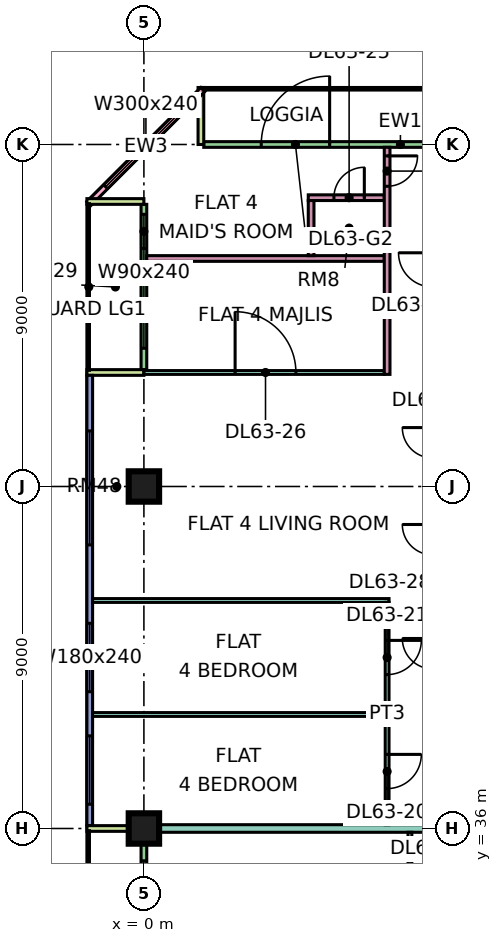
"""IFC4 building model, lengths in metres.
Left out: names, types, materials, properties, quantities, classifications, styles, units other than length and angle.
Written with IfcOpenShell. Run it as: python <this file> out.ifc"""

import sys

from ifc_helpers import new_model, si_unit, direction, frame, frame_2d, origin, origin_2d, place, context, subcontext, project, spatial, rectangle, extrude, element, fill, save


model = new_model("IFC4")
c1 = context("Model", 3, precision=1e-05, world=origin(), true_north=direction((0.0, 1.0)))
c2 = subcontext(c1, "Body", "Model", "MODEL_VIEW")
j1 = project(units=[si_unit("LENGTHUNIT", "METRE"), si_unit("PLANEANGLEUNIT", "RADIAN")], contexts=[c1])
p1 = place(None, origin())
s1 = spatial("IfcSite", under=j1, at=p1, CompositionType="ELEMENT")
p2 = place(p1, origin())
s2 = spatial("IfcBuilding", under=s1, at=p2, CompositionType="ELEMENT")
p3 = place(p2, frame((0.0, 0.0, 273.4)))
s3 = spatial("IfcBuildingStorey", under=s2, at=p3, CompositionType="ELEMENT", Elevation=273.4)
p4 = place(p3, frame((0.0, 36.0, 0.0), z_axis=(0.0, 0.0, 1.0), x_axis=(1.0, 0.0, 0.0)))
e1 = element("IfcColumn", 1, at=p4, inside=s3, PredefinedType="COLUMN", context=c2, shape_type="SweptSolid", body=[
    extrude(rectangle(XDim=0.8, YDim=0.8, at=origin_2d()), origin(), (0.0, 0.0, 1.0), 3.75),
])
p5 = place(p3, frame((0.0, 45.0, 0.0), z_axis=(0.0, 0.0, 1.0), x_axis=(1.0, 0.0, 0.0)))
e2 = element("IfcColumn", 2, at=p5, inside=s3, PredefinedType="COLUMN", context=c2, shape_type="SweptSolid", body=[
    extrude(rectangle(XDim=0.8, YDim=0.8, at=origin_2d()), origin(), (0.0, 0.0, 1.0), 3.75),
])
p6 = place(p3, frame((11.925, 54.0, 0.0), z_axis=(0.0, 0.0, 1.0), x_axis=(-1.0, 0.0, 0.0)))
e3 = element("IfcWall", 3, at=p6, inside=s3, PredefinedType="SOLIDWALL", context=c2, shape_type="SweptSolid", body=[
    extrude(rectangle(XDim=10.35, YDim=0.15, at=frame_2d((5.175, 0.0))), origin(), (0.0, 0.0, 1.0), 3.35),
])
p7 = place(p6, frame((0.875, 0.0, 0.45)))
e4 = element("IfcOpeningElement", 4, at=p7, cuts=e3, PredefinedType="OPENING", context=c2, shape_type="SweptSolid", body=[
    extrude(rectangle(XDim=3.0, YDim=2.4, at=frame_2d((1.5, 1.2))), frame((0.0, 0.085, 0.0), z_axis=(0.0, -1.0, 0.0), x_axis=(1.0, 0.0, 0.0)), (0.0, 0.0, 1.0), 0.17),
])
p8 = place(p6, frame((7.038, 0.0, 0.0)))
e5 = element("IfcOpeningElement", 5, at=p8, cuts=e3, PredefinedType="OPENING", context=c2, shape_type="SweptSolid", body=[
    extrude(rectangle(XDim=1.8, YDim=2.4, at=frame_2d((0.9, 1.2))), frame((0.0, 0.085, 0.0), z_axis=(0.0, -1.0, 0.0), x_axis=(1.0, 0.0, 0.0)), (0.0, 0.0, 1.0), 0.17),
])
p9 = place(p3, frame((1.5, 55.5, 0.0), z_axis=(0.0, 0.0, 1.0), x_axis=(0.0, -1.0, 0.0)))
e6 = element("IfcWall", 6, at=p9, inside=s3, PredefinedType="SOLIDWALL", context=c2, shape_type="SweptSolid", body=[
    extrude(rectangle(XDim=1.5, YDim=0.15, at=frame_2d((0.75, 0.0))), origin(), (0.0, 0.0, 1.0), 3.35),
])
p10 = place(p3, frame((1.553, 55.447, 0.0), z_axis=(0.0, 0.0, 1.0), x_axis=(-0.707106781187, -0.707106781187, 0.0)))
e7 = element("IfcWall", 7, at=p10, inside=s3, PredefinedType="SOLIDWALL", context=c2, shape_type="SweptSolid", body=[
    extrude(rectangle(XDim=4.243, YDim=0.15, at=frame_2d((2.121, 0.0))), origin(), (0.0, 0.0, 1.0), 3.35),
])
p11 = place(p10, frame((0.621, 0.0, 0.45)))
e8 = element("IfcOpeningElement", 8, at=p11, cuts=e7, PredefinedType="OPENING", context=c2, shape_type="SweptSolid", body=[
    extrude(rectangle(XDim=3.0, YDim=2.4, at=frame_2d((1.5, 1.2))), frame((0.0, 0.085, 0.0), z_axis=(0.0, -1.0, 0.0), x_axis=(1.0, 0.0, 0.0)), (0.0, 0.0, 1.0), 0.17),
])
p12 = place(p3, frame((0.0, 52.425, 0.0), z_axis=(0.0, 0.0, 1.0), x_axis=(0.0, -1.0, 0.0)))
e9 = element("IfcWall", 9, at=p12, inside=s3, PredefinedType="SOLIDWALL", context=c2, shape_type="SweptSolid", body=[
    extrude(rectangle(XDim=4.35, YDim=0.15, at=frame_2d((2.175, 0.0))), origin(), (0.0, 0.0, 1.0), 3.35),
])
p13 = place(p12, frame((0.262, 0.0, 0.45)))
e10 = element("IfcOpeningElement", 10, at=p13, cuts=e9, PredefinedType="OPENING", context=c2, shape_type="SweptSolid", body=[
    extrude(rectangle(XDim=0.9, YDim=2.4, at=frame_2d((0.45, 1.2))), frame((0.0, 0.085, 0.0), z_axis=(0.0, -1.0, 0.0), x_axis=(1.0, 0.0, 0.0)), (0.0, 0.0, 1.0), 0.17),
])
p14 = place(p12, frame((1.988, 0.0, 0.45)))
e11 = element("IfcOpeningElement", 11, at=p14, cuts=e9, PredefinedType="OPENING", context=c2, shape_type="SweptSolid", body=[
    extrude(rectangle(XDim=1.8, YDim=2.4, at=frame_2d((0.9, 1.2))), frame((0.0, 0.085, 0.0), z_axis=(0.0, -1.0, 0.0), x_axis=(1.0, 0.0, 0.0)), (0.0, 0.0, 1.0), 0.17),
])
for number, where, z_axis, x_axis in (
    (12, (-1.5, 52.5, 0.0), (0.0, 0.0, 1.0), (1.0, 0.0, 0.0)),
    (13, (-1.5, 48.0, 0.0), (0.0, 0.0, 1.0), (1.0, 0.0, 0.0)),
):
    element("IfcWall", number, at=place(p3, frame(where, z_axis=z_axis, x_axis=x_axis)), inside=s3, PredefinedType="SOLIDWALL", context=c2, shape_type="SweptSolid", body=[
        extrude(rectangle(XDim=1.5, YDim=0.15, at=frame_2d((0.75, 0.0))), origin(), (0.0, 0.0, 1.0), 3.35),
    ])
p15 = place(p3, frame((-1.425, 47.925, 0.0), z_axis=(0.0, 0.0, 1.0), x_axis=(0.0, -1.0, 0.0)))
e14 = element("IfcWall", 14, at=p15, inside=s3, PredefinedType="SOLIDWALL", context=c2, shape_type="SweptSolid", body=[
    extrude(rectangle(XDim=11.85, YDim=0.15, at=frame_2d((5.925, 0.0))), origin(), (0.0, 0.0, 1.0), 3.35),
])
p16 = place(p15, frame((1.462, 0.0, 0.45)))
e15 = element("IfcOpeningElement", 15, at=p16, cuts=e14, PredefinedType="OPENING", context=c2, shape_type="SweptSolid", body=[
    extrude(rectangle(XDim=3.0, YDim=2.4, at=frame_2d((1.5, 1.2))), frame((0.0, 0.085, 0.0), z_axis=(0.0, -1.0, 0.0), x_axis=(1.0, 0.0, 0.0)), (0.0, 0.0, 1.0), 0.17),
])
p17 = place(p15, frame((6.525, 0.0, 0.45)))
e16 = element("IfcOpeningElement", 16, at=p17, cuts=e14, PredefinedType="OPENING", context=c2, shape_type="SweptSolid", body=[
    extrude(rectangle(XDim=1.8, YDim=2.4, at=frame_2d((0.9, 1.2))), frame((0.0, 0.085, 0.0), z_axis=(0.0, -1.0, 0.0), x_axis=(1.0, 0.0, 0.0)), (0.0, 0.0, 1.0), 0.17),
])
p18 = place(p15, frame((9.488, 0.0, 0.45)))
e17 = element("IfcOpeningElement", 17, at=p18, cuts=e14, PredefinedType="OPENING", context=c2, shape_type="SweptSolid", body=[
    extrude(rectangle(XDim=1.8, YDim=2.4, at=frame_2d((0.9, 1.2))), frame((0.0, 0.085, 0.0), z_axis=(0.0, -1.0, 0.0), x_axis=(1.0, 0.0, 0.0)), (0.0, 0.0, 1.0), 0.17),
])
p19 = place(p3, frame((0.0, 35.925, 0.0), z_axis=(0.0, 0.0, 1.0), x_axis=(0.0, -1.0, 0.0)))
e18 = element("IfcWall", 18, at=p19, inside=s3, PredefinedType="SOLIDWALL", context=c2, shape_type="SweptSolid", body=[
    extrude(rectangle(XDim=11.85, YDim=0.15, at=frame_2d((5.925, 0.0))), origin(), (0.0, 0.0, 1.0), 3.35),
])
p20 = place(p19, frame((0.775, 0.0, 0.45)))
e19 = element("IfcOpeningElement", 19, at=p20, cuts=e18, PredefinedType="OPENING", context=c2, shape_type="SweptSolid", body=[
    extrude(rectangle(XDim=1.8, YDim=2.4, at=frame_2d((0.9, 1.2))), frame((0.0, 0.085, 0.0), z_axis=(0.0, -1.0, 0.0), x_axis=(1.0, 0.0, 0.0)), (0.0, 0.0, 1.0), 0.17),
])
p21 = place(p19, frame((3.525, 0.0, 0.0)))
e20 = element("IfcOpeningElement", 20, at=p21, cuts=e18, PredefinedType="OPENING", context=c2, shape_type="SweptSolid", body=[
    extrude(rectangle(XDim=1.8, YDim=2.4, at=frame_2d((0.9, 1.2))), frame((0.0, 0.085, 0.0), z_axis=(0.0, -1.0, 0.0), x_axis=(1.0, 0.0, 0.0)), (0.0, 0.0, 1.0), 0.17),
])
p22 = place(p19, frame((7.175, 0.0, 0.45)))
e21 = element("IfcOpeningElement", 21, at=p22, cuts=e18, PredefinedType="OPENING", context=c2, shape_type="SweptSolid", body=[
    extrude(rectangle(XDim=3.0, YDim=2.4, at=frame_2d((1.5, 1.2))), frame((0.0, 0.085, 0.0), z_axis=(0.0, -1.0, 0.0), x_axis=(1.0, 0.0, 0.0)), (0.0, 0.0, 1.0), 0.17),
])
p23 = place(p3, frame((-1.5, 36.0, 0.0), z_axis=(0.0, 0.0, 1.0), x_axis=(1.0, 0.0, 0.0)))
e22 = element("IfcWall", 22, at=p23, inside=s3, PredefinedType="SOLIDWALL", context=c2, shape_type="SweptSolid", body=[
    extrude(rectangle(XDim=1.5, YDim=0.15, at=frame_2d((0.75, 0.0))), origin(), (0.0, 0.0, 1.0), 3.35),
])
p24 = place(p3, frame((-1.351, 39.0, 0.0), z_axis=(0.0, 0.0, 1.0), x_axis=(1.0, 0.0, 0.0)))
e23 = element("IfcWall", 23, at=p24, inside=s3, PredefinedType="PARTITIONING", context=c2, shape_type="SweptSolid", body=[
    extrude(rectangle(XDim=7.701, YDim=0.1, at=frame_2d((3.851, 0.0))), origin(), (0.0, 0.0, 1.0), 3.35),
])
e24 = element("IfcWall", 24, at=p4, inside=s3, PredefinedType="PARTITIONING", context=c2, shape_type="SweptSolid", body=[
    extrude(rectangle(XDim=12.3, YDim=0.2, at=frame_2d((6.15, 0.0))), origin(), (0.0, 0.0, 1.0), 3.35),
])
p25 = place(p3, frame((-1.35, 42.0, 0.0), z_axis=(0.0, 0.0, 1.0), x_axis=(1.0, 0.0, 0.0)))
e25 = element("IfcWall", 25, at=p25, inside=s3, PredefinedType="PARTITIONING", context=c2, shape_type="SweptSolid", body=[
    extrude(rectangle(XDim=7.8, YDim=0.1, at=frame_2d((3.9, 0.0))), origin(), (0.0, 0.0, 1.0), 3.35),
])
p26 = place(p3, frame((0.0, 48.0, 0.0), z_axis=(0.0, 0.0, 1.0), x_axis=(1.0, 0.0, 0.0)))
e26 = element("IfcWall", 26, at=p26, inside=s3, PredefinedType="PARTITIONING", context=c2, shape_type="SweptSolid", body=[
    extrude(rectangle(XDim=6.325, YDim=0.1, at=frame_2d((3.163, 0.0))), origin(), (0.0, 0.0, 1.0), 3.35),
])
p27 = place(p26, frame((2.4, 0.0, 0.0)))
e27 = element("IfcOpeningElement", 27, at=p27, cuts=e26, PredefinedType="OPENING", context=c2, shape_type="SweptSolid", body=[
    extrude(rectangle(XDim=1.6, YDim=2.1, at=frame_2d((0.8, 1.05))), frame((0.0, 0.06, 0.0), z_axis=(0.0, -1.0, 0.0), x_axis=(1.0, 0.0, 0.0)), (0.0, 0.0, 1.0), 0.12),
])
p28 = place(p3, frame((0.074, 51.0, 0.0), z_axis=(0.0, 0.0, 1.0), x_axis=(1.0, 0.0, 0.0)))
e28 = element("IfcWall", 28, at=p28, inside=s3, PredefinedType="PARTITIONING", context=c2, shape_type="SweptSolid", body=[
    extrude(rectangle(XDim=6.251, YDim=0.15, at=frame_2d((3.125, 0.0))), origin(), (0.0, 0.0, 1.0), 3.35),
])
p29 = place(p3, frame((4.325, 52.6, 0.0), z_axis=(0.0, 0.0, 1.0), x_axis=(1.0, 0.0, 0.0)))
e29 = element("IfcWall", 29, at=p29, inside=s3, PredefinedType="PARTITIONING", context=c2, shape_type="SweptSolid", body=[
    extrude(rectangle(XDim=2.0, YDim=0.15, at=frame_2d((1.0, 0.0))), origin(), (0.0, 0.0, 1.0), 3.35),
])
p30 = place(p29, frame((0.675, 0.0, 0.0)))
e30 = element("IfcOpeningElement", 30, at=p30, cuts=e29, PredefinedType="OPENING", context=c2, shape_type="SweptSolid", body=[
    extrude(rectangle(XDim=0.8, YDim=2.1, at=frame_2d((0.4, 1.05))), frame((0.0, 0.085, 0.0), z_axis=(0.0, -1.0, 0.0), x_axis=(1.0, 0.0, 0.0)), (0.0, 0.0, 1.0), 0.17),
])
p31 = place(p3, frame((4.4, 51.075, 0.0), z_axis=(0.0, 0.0, 1.0), x_axis=(0.0, 1.0, 0.0)))
e31 = element("IfcWall", 31, at=p31, inside=s3, PredefinedType="PARTITIONING", context=c2, shape_type="SweptSolid", body=[
    extrude(rectangle(XDim=1.45, YDim=0.15, at=frame_2d((0.725, 0.0))), origin(), (0.0, 0.0, 1.0), 3.35),
])
p32 = place(p3, frame((6.4, 36.1, 0.0), z_axis=(0.0, 0.0, 1.0), x_axis=(0.0, 1.0, 0.0)))
e32 = element("IfcWall", 32, at=p32, inside=s3, PredefinedType="PARTITIONING", context=c2, shape_type="SweptSolid", body=[
    extrude(rectangle(XDim=5.85, YDim=0.1, at=frame_2d((2.925, 0.0))), origin(), (0.0, 0.0, 1.0), 3.35),
])
p33 = place(p32, frame((0.95, 0.0, 0.0)))
e33 = element("IfcOpeningElement", 33, at=p33, cuts=e32, PredefinedType="OPENING", context=c2, shape_type="SweptSolid", body=[
    extrude(rectangle(XDim=0.9, YDim=2.1, at=frame_2d((0.45, 1.05))), frame((0.0, 0.06, 0.0), z_axis=(0.0, -1.0, 0.0), x_axis=(1.0, 0.0, 0.0)), (0.0, 0.0, 1.0), 0.12),
])
p34 = place(p32, frame((3.95, 0.0, 0.0)))
e34 = element("IfcOpeningElement", 34, at=p34, cuts=e32, PredefinedType="OPENING", context=c2, shape_type="SweptSolid", body=[
    extrude(rectangle(XDim=0.9, YDim=2.1, at=frame_2d((0.45, 1.05))), frame((0.0, 0.06, 0.0), z_axis=(0.0, -1.0, 0.0), x_axis=(1.0, 0.0, 0.0)), (0.0, 0.0, 1.0), 0.12),
])
p35 = place(p3, frame((6.4, 47.95, 0.0), z_axis=(0.0, 0.0, 1.0), x_axis=(0.0, 1.0, 0.0)))
e35 = element("IfcWall", 35, at=p35, inside=s3, PredefinedType="PARTITIONING", context=c2, shape_type="SweptSolid", body=[
    extrude(rectangle(XDim=5.976, YDim=0.15, at=frame_2d((2.988, 0.0))), origin(), (0.0, 0.0, 1.0), 3.35),
])
p36 = place(p35, frame((4.95, 0.0, 0.0)))
e36 = element("IfcOpeningElement", 36, at=p36, cuts=e35, PredefinedType="OPENING", context=c2, shape_type="SweptSolid", body=[
    extrude(rectangle(XDim=0.8, YDim=2.1, at=frame_2d((0.4, 1.05))), frame((0.0, 0.085, 0.0), z_axis=(0.0, -1.0, 0.0), x_axis=(1.0, 0.0, 0.0)), (0.0, 0.0, 1.0), 0.17),
])
p37 = place(p3, frame((7.0, 30.05, 0.0), z_axis=(0.0, 0.0, 1.0), x_axis=(0.0, 1.0, 0.0)))
e37 = element("IfcWall", 37, at=p37, inside=s3, PredefinedType="PARTITIONING", context=c2, shape_type="SweptSolid", body=[
    extrude(rectangle(XDim=5.85, YDim=0.1, at=frame_2d((2.925, 0.0))), origin(), (0.0, 0.0, 1.0), 3.35),
])
p38 = place(p37, frame((1.0, 0.0, 0.0)))
e38 = element("IfcOpeningElement", 38, at=p38, cuts=e37, PredefinedType="OPENING", context=c2, shape_type="SweptSolid", body=[
    extrude(rectangle(XDim=0.9, YDim=2.1, at=frame_2d((0.45, 1.05))), frame((0.0, 0.06, 0.0), z_axis=(0.0, -1.0, 0.0), x_axis=(1.0, 0.0, 0.0)), (0.0, 0.0, 1.0), 0.12),
])
p39 = place(p37, frame((4.0, 0.0, 0.0)))
e39 = element("IfcOpeningElement", 39, at=p39, cuts=e37, PredefinedType="OPENING", context=c2, shape_type="SweptSolid", body=[
    extrude(rectangle(XDim=0.9, YDim=2.1, at=frame_2d((0.45, 1.05))), frame((0.0, 0.06, 0.0), z_axis=(0.0, -1.0, 0.0), x_axis=(1.0, 0.0, 0.0)), (0.0, 0.0, 1.0), 0.12),
])
p40 = place(p8, frame((1.8, 0.0, 0.0), z_axis=(0.0, 0.0, 1.0), x_axis=(-1.0, 0.0, 0.0)))
e40 = element("IfcDoor", 40, at=p40, inside=s3, OperationType="DOUBLE_DOOR_SINGLE_SWING", PredefinedType="DOOR", context=c2, shape_type="SweptSolid", body=[
    extrude(rectangle(XDim=1.8, YDim=2.4, at=frame_2d((0.9, 1.2))), frame((0.0, 0.025, 0.0), z_axis=(0.0, -1.0, 0.0), x_axis=(1.0, 0.0, 0.0)), (0.0, 0.0, 1.0), 0.05),
])
fill(e5, e40)
p41 = place(p11, origin())
e41 = element("IfcWindow", 41, at=p41, inside=s3, PartitioningType="SINGLE_PANEL", PredefinedType="WINDOW", context=c2, shape_type="SweptSolid", body=[
    extrude(rectangle(XDim=3.0, YDim=2.4, at=frame_2d((1.5, 1.2))), frame((0.0, 0.03, 0.0), z_axis=(0.0, -1.0, 0.0), x_axis=(1.0, 0.0, 0.0)), (0.0, 0.0, 1.0), 0.06),
])
fill(e8, e41)
p42 = place(p13, origin())
e42 = element("IfcWindow", 42, at=p42, inside=s3, PartitioningType="SINGLE_PANEL", PredefinedType="WINDOW", context=c2, shape_type="SweptSolid", body=[
    extrude(rectangle(XDim=0.9, YDim=2.4, at=frame_2d((0.45, 1.2))), frame((0.0, 0.03, 0.0), z_axis=(0.0, -1.0, 0.0), x_axis=(1.0, 0.0, 0.0)), (0.0, 0.0, 1.0), 0.06),
])
fill(e10, e42)
p43 = place(p14, origin())
e43 = element("IfcWindow", 43, at=p43, inside=s3, PartitioningType="SINGLE_PANEL", PredefinedType="WINDOW", context=c2, shape_type="SweptSolid", body=[
    extrude(rectangle(XDim=1.8, YDim=2.4, at=frame_2d((0.9, 1.2))), frame((0.0, 0.03, 0.0), z_axis=(0.0, -1.0, 0.0), x_axis=(1.0, 0.0, 0.0)), (0.0, 0.0, 1.0), 0.06),
])
fill(e11, e43)
p44 = place(p16, origin())
e44 = element("IfcWindow", 44, at=p44, inside=s3, PartitioningType="SINGLE_PANEL", PredefinedType="WINDOW", context=c2, shape_type="SweptSolid", body=[
    extrude(rectangle(XDim=3.0, YDim=2.4, at=frame_2d((1.5, 1.2))), frame((0.0, 0.03, 0.0), z_axis=(0.0, -1.0, 0.0), x_axis=(1.0, 0.0, 0.0)), (0.0, 0.0, 1.0), 0.06),
])
fill(e15, e44)
p45 = place(p17, origin())
e45 = element("IfcWindow", 45, at=p45, inside=s3, PartitioningType="SINGLE_PANEL", PredefinedType="WINDOW", context=c2, shape_type="SweptSolid", body=[
    extrude(rectangle(XDim=1.8, YDim=2.4, at=frame_2d((0.9, 1.2))), frame((0.0, 0.03, 0.0), z_axis=(0.0, -1.0, 0.0), x_axis=(1.0, 0.0, 0.0)), (0.0, 0.0, 1.0), 0.06),
])
fill(e16, e45)
p46 = place(p18, origin())
e46 = element("IfcWindow", 46, at=p46, inside=s3, PartitioningType="SINGLE_PANEL", PredefinedType="WINDOW", context=c2, shape_type="SweptSolid", body=[
    extrude(rectangle(XDim=1.8, YDim=2.4, at=frame_2d((0.9, 1.2))), frame((0.0, 0.03, 0.0), z_axis=(0.0, -1.0, 0.0), x_axis=(1.0, 0.0, 0.0)), (0.0, 0.0, 1.0), 0.06),
])
fill(e17, e46)
p47 = place(p20, origin())
e47 = element("IfcWindow", 47, at=p47, inside=s3, PartitioningType="SINGLE_PANEL", PredefinedType="WINDOW", context=c2, shape_type="SweptSolid", body=[
    extrude(rectangle(XDim=1.8, YDim=2.4, at=frame_2d((0.9, 1.2))), frame((0.0, 0.03, 0.0), z_axis=(0.0, -1.0, 0.0), x_axis=(1.0, 0.0, 0.0)), (0.0, 0.0, 1.0), 0.06),
])
fill(e19, e47)
p48 = place(p33, origin())
e48 = element("IfcDoor", 48, at=p48, inside=s3, OperationType="SINGLE_SWING_RIGHT", PredefinedType="DOOR", context=c2, shape_type="SweptSolid", body=[
    extrude(rectangle(XDim=0.9, YDim=2.1, at=frame_2d((0.45, 1.05))), frame((0.0, 0.025, 0.0), z_axis=(0.0, -1.0, 0.0), x_axis=(1.0, 0.0, 0.0)), (0.0, 0.0, 1.0), 0.05),
])
fill(e33, e48)
p49 = place(p34, origin())
e49 = element("IfcDoor", 49, at=p49, inside=s3, OperationType="SINGLE_SWING_RIGHT", PredefinedType="DOOR", context=c2, shape_type="SweptSolid", body=[
    extrude(rectangle(XDim=0.9, YDim=2.1, at=frame_2d((0.45, 1.05))), frame((0.0, 0.025, 0.0), z_axis=(0.0, -1.0, 0.0), x_axis=(1.0, 0.0, 0.0)), (0.0, 0.0, 1.0), 0.05),
])
fill(e34, e49)
p50 = place(p36, origin())
e50 = element("IfcDoor", 50, at=p50, inside=s3, OperationType="SINGLE_SWING_RIGHT", PredefinedType="DOOR", context=c2, shape_type="SweptSolid", body=[
    extrude(rectangle(XDim=0.8, YDim=2.1, at=frame_2d((0.4, 1.05))), frame((0.0, 0.025, 0.0), z_axis=(0.0, -1.0, 0.0), x_axis=(1.0, 0.0, 0.0)), (0.0, 0.0, 1.0), 0.05),
])
fill(e36, e50)
p51 = place(p30, frame((0.8, 0.0, 0.0), z_axis=(0.0, 0.0, 1.0), x_axis=(-1.0, 0.0, 0.0)))
e51 = element("IfcDoor", 51, at=p51, inside=s3, OperationType="SINGLE_SWING_RIGHT", PredefinedType="DOOR", context=c2, shape_type="SweptSolid", body=[
    extrude(rectangle(XDim=0.8, YDim=2.1, at=frame_2d((0.4, 1.05))), frame((0.0, 0.025, 0.0), z_axis=(0.0, -1.0, 0.0), x_axis=(1.0, 0.0, 0.0)), (0.0, 0.0, 1.0), 0.05),
])
fill(e30, e51)
p52 = place(p27, origin())
e52 = element("IfcDoor", 52, at=p52, inside=s3, OperationType="DOUBLE_DOOR_SINGLE_SWING", PredefinedType="DOOR", context=c2, shape_type="SweptSolid", body=[
    extrude(rectangle(XDim=1.6, YDim=2.1, at=frame_2d((0.8, 1.05))), frame((0.0, 0.025, 0.0), z_axis=(0.0, -1.0, 0.0), x_axis=(1.0, 0.0, 0.0)), (0.0, 0.0, 1.0), 0.05),
])
fill(e27, e52)
save(model, sys.argv[1])
